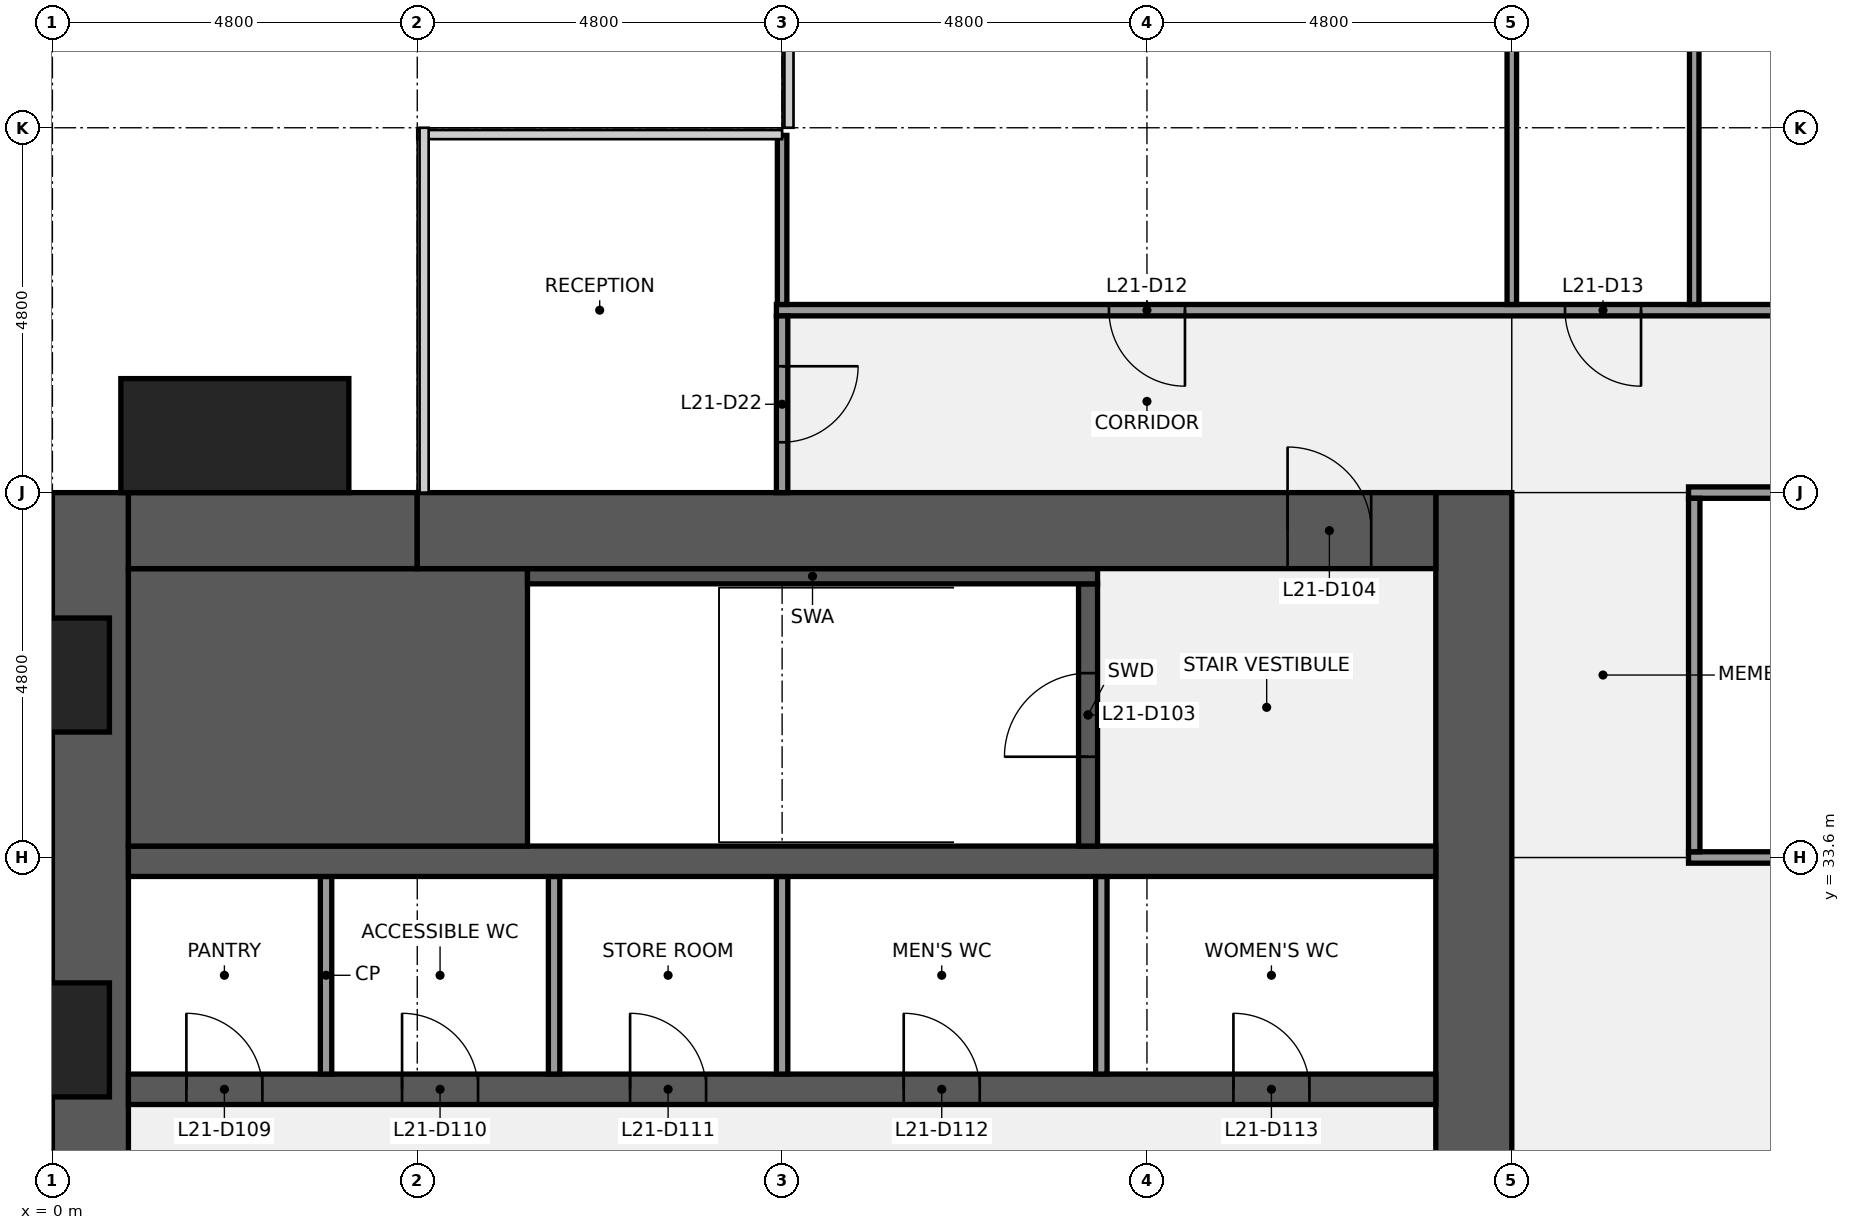
"""IFC4 building model, lengths in metres.
Left out: names, types, materials, properties, quantities, classifications, styles, units other than length and angle.
Written with IfcOpenShell. Run it as: python <this file> out.ifc"""

import sys

from ifc_helpers import new_model, si_unit, direction, frame, frame_2d, origin, origin_2d, place, context, subcontext, project, spatial, rectangle, extrude, element, fill, save


model = new_model("IFC4")
c1 = context("Model", 3, precision=1e-05, world=origin(), true_north=direction((0.0, 1.0)))
c2 = subcontext(c1, "Body", "Model", "MODEL_VIEW")
j1 = project(units=[si_unit("LENGTHUNIT", "METRE"), si_unit("PLANEANGLEUNIT", "RADIAN")], contexts=[c1])
p1 = place(None, origin())
s1 = spatial("IfcSite", under=j1, at=p1, CompositionType="ELEMENT")
p2 = place(p1, origin())
s2 = spatial("IfcBuilding", under=s1, at=p2, CompositionType="ELEMENT")
p3 = place(p2, frame((0.0, 0.0, 104.1)))
s3 = spatial("IfcBuildingStorey", under=s2, at=p3, CompositionType="ELEMENT", Elevation=104.1)
p4 = place(p3, frame((0.5, 9.6, 0.0), z_axis=(0.0, 0.0, 1.0), x_axis=(0.0, 1.0, 0.0)))
e1 = element("IfcWall", 1, at=p4, inside=s3, PredefinedType="SHEAR", context=c2, shape_type="SweptSolid", body=[
    extrude(rectangle(XDim=28.8, YDim=1.0, at=frame_2d((14.4, 0.0))), origin(), (0.0, 0.0, 1.0), 3.84),
])
p5 = place(p4, frame((8.85, 0.0, 0.9)))
e2 = element("IfcOpeningElement", 2, at=p5, cuts=e1, PredefinedType="OPENING", context=c2, shape_type="SweptSolid", body=[
    extrude(rectangle(XDim=1.5, YDim=1.5, at=frame_2d((0.75, 0.75))), frame((0.0, 0.51, 0.0), z_axis=(0.0, -1.0, 0.0), x_axis=(1.0, 0.0, 0.0)), (0.0, 0.0, 1.0), 1.02),
])
p6 = place(p4, frame((18.45, 0.0, 0.9)))
e3 = element("IfcOpeningElement", 3, at=p6, cuts=e1, PredefinedType="OPENING", context=c2, shape_type="SweptSolid", body=[
    extrude(rectangle(XDim=1.5, YDim=1.5, at=frame_2d((0.75, 0.75))), frame((0.0, 0.51, 0.0), z_axis=(0.0, -1.0, 0.0), x_axis=(1.0, 0.0, 0.0)), (0.0, 0.0, 1.0), 1.02),
])
p7 = place(p3, frame((18.7, 38.4, 0.0), z_axis=(0.0, 0.0, 1.0), x_axis=(0.0, -1.0, 0.0)))
e4 = element("IfcWall", 4, at=p7, inside=s3, PredefinedType="SHEAR", context=c2, shape_type="SweptSolid", body=[
    extrude(rectangle(XDim=28.8, YDim=1.0, at=frame_2d((14.4, 0.0))), origin(), (0.0, 0.0, 1.0), 3.84),
])
p8 = place(p7, frame((18.3, 0.0, 0.0)))
e5 = element("IfcOpeningElement", 5, at=p8, cuts=e4, PredefinedType="OPENING", context=c2, shape_type="SweptSolid", body=[
    extrude(rectangle(XDim=1.8, YDim=2.1, at=frame_2d((0.9, 1.05))), frame((0.0, 0.51, 0.0), z_axis=(0.0, -1.0, 0.0), x_axis=(1.0, 0.0, 0.0)), (0.0, 0.0, 1.0), 1.02),
])
p9 = place(p7, frame((8.7, 0.0, 0.0)))
e6 = element("IfcOpeningElement", 6, at=p9, cuts=e4, PredefinedType="OPENING", context=c2, shape_type="SweptSolid", body=[
    extrude(rectangle(XDim=1.8, YDim=2.1, at=frame_2d((0.9, 1.05))), frame((0.0, 0.51, 0.0), z_axis=(0.0, -1.0, 0.0), x_axis=(1.0, 0.0, 0.0)), (0.0, 0.0, 1.0), 1.02),
])
p10 = place(p3, frame((1.0, 30.55, 0.0), z_axis=(0.0, 0.0, 1.0), x_axis=(1.0, 0.0, 0.0)))
e7 = element("IfcWall", 7, at=p10, inside=s3, PredefinedType="SHEAR", context=c2, shape_type="SweptSolid", body=[
    extrude(rectangle(XDim=17.2, YDim=0.4, at=frame_2d((8.6, 0.0))), origin(), (0.0, 0.0, 1.0), 3.84),
])
p11 = place(p10, frame((0.762, 0.0, 0.0)))
e8 = element("IfcOpeningElement", 8, at=p11, cuts=e7, PredefinedType="OPENING", context=c2, shape_type="SweptSolid", body=[
    extrude(rectangle(XDim=1.0, YDim=2.1, at=frame_2d((0.5, 1.05))), frame((0.0, 0.21, 0.0), z_axis=(0.0, -1.0, 0.0), x_axis=(1.0, 0.0, 0.0)), (0.0, 0.0, 1.0), 0.42),
])
p12 = place(p10, frame((3.6, 0.0, 0.0)))
e9 = element("IfcOpeningElement", 9, at=p12, cuts=e7, PredefinedType="OPENING", context=c2, shape_type="SweptSolid", body=[
    extrude(rectangle(XDim=1.0, YDim=2.1, at=frame_2d((0.5, 1.05))), frame((0.0, 0.21, 0.0), z_axis=(0.0, -1.0, 0.0), x_axis=(1.0, 0.0, 0.0)), (0.0, 0.0, 1.0), 0.42),
])
p13 = place(p10, frame((6.6, 0.0, 0.0)))
e10 = element("IfcOpeningElement", 10, at=p13, cuts=e7, PredefinedType="OPENING", context=c2, shape_type="SweptSolid", body=[
    extrude(rectangle(XDim=1.0, YDim=2.1, at=frame_2d((0.5, 1.05))), frame((0.0, 0.21, 0.0), z_axis=(0.0, -1.0, 0.0), x_axis=(1.0, 0.0, 0.0)), (0.0, 0.0, 1.0), 0.42),
])
p14 = place(p10, frame((10.2, 0.0, 0.0)))
e11 = element("IfcOpeningElement", 11, at=p14, cuts=e7, PredefinedType="OPENING", context=c2, shape_type="SweptSolid", body=[
    extrude(rectangle(XDim=1.0, YDim=2.1, at=frame_2d((0.5, 1.05))), frame((0.0, 0.21, 0.0), z_axis=(0.0, -1.0, 0.0), x_axis=(1.0, 0.0, 0.0)), (0.0, 0.0, 1.0), 0.42),
])
p15 = place(p10, frame((14.538, 0.0, 0.0)))
e12 = element("IfcOpeningElement", 12, at=p15, cuts=e7, PredefinedType="OPENING", context=c2, shape_type="SweptSolid", body=[
    extrude(rectangle(XDim=1.0, YDim=2.1, at=frame_2d((0.5, 1.05))), frame((0.0, 0.21, 0.0), z_axis=(0.0, -1.0, 0.0), x_axis=(1.0, 0.0, 0.0)), (0.0, 0.0, 1.0), 0.42),
])
for number, where, z_axis, x_axis in (
    (13, (3.6, 30.75, 0.0), (0.0, 0.0, 1.0), (0.0, 1.0, 0.0)),
    (14, (6.6, 30.75, 0.0), (0.0, 0.0, 1.0), (0.0, 1.0, 0.0)),
    (15, (9.6, 30.75, 0.0), (0.0, 0.0, 1.0), (0.0, 1.0, 0.0)),
    (16, (13.8, 30.75, 0.0), (0.0, 0.0, 1.0), (0.0, 1.0, 0.0)),
):
    element("IfcWall", number, at=place(p3, frame(where, z_axis=z_axis, x_axis=x_axis)), inside=s3, PredefinedType="PARTITIONING", context=c2, shape_type="SweptSolid", body=[
        extrude(rectangle(XDim=2.6, YDim=0.15, at=frame_2d((1.3, 0.0))), origin(), (0.0, 0.0, 1.0), 3.84),
    ])
p16 = place(p3, frame((1.0, 33.55, 0.0), z_axis=(0.0, 0.0, 1.0), x_axis=(1.0, 0.0, 0.0)))
e17 = element("IfcWall", 17, at=p16, inside=s3, PredefinedType="SHEAR", context=c2, shape_type="SweptSolid", body=[
    extrude(rectangle(XDim=17.2, YDim=0.4, at=frame_2d((8.6, 0.0))), origin(), (0.0, 0.0, 1.0), 3.84),
])
p17 = place(p3, frame((1.0, 35.575, 0.0), z_axis=(0.0, 0.0, 1.0), x_axis=(1.0, 0.0, 0.0)))
e18 = element("IfcWall", 18, at=p17, inside=s3, PredefinedType="SHEAR", context=c2, shape_type="SweptSolid", body=[
    extrude(rectangle(XDim=5.25, YDim=3.65, at=frame_2d((2.625, 0.0))), origin(), (0.0, 0.0, 1.0), 3.84),
])
p18 = place(p3, frame((13.625, 33.75, 0.0), z_axis=(0.0, 0.0, 1.0), x_axis=(0.0, 1.0, 0.0)))
e19 = element("IfcWall", 19, at=p18, inside=s3, PredefinedType="SHEAR", context=c2, shape_type="SweptSolid", body=[
    extrude(rectangle(XDim=3.45, YDim=0.25, at=frame_2d((1.725, 0.0))), origin(), (0.0, 0.0, 1.0), 3.84),
])
p19 = place(p18, frame((1.175, 0.0, 0.0)))
e20 = element("IfcOpeningElement", 20, at=p19, cuts=e19, PredefinedType="OPENING", context=c2, shape_type="SweptSolid", body=[
    extrude(rectangle(XDim=1.1, YDim=2.1, at=frame_2d((0.55, 1.05))), frame((0.0, 0.135, 0.0), z_axis=(0.0, -1.0, 0.0), x_axis=(1.0, 0.0, 0.0)), (0.0, 0.0, 1.0), 0.27),
])
p20 = place(p3, frame((6.25, 37.3, 0.0), z_axis=(0.0, 0.0, 1.0), x_axis=(1.0, 0.0, 0.0)))
e21 = element("IfcWall", 21, at=p20, inside=s3, PredefinedType="SHEAR", context=c2, shape_type="SweptSolid", body=[
    extrude(rectangle(XDim=7.5, YDim=0.2, at=frame_2d((3.75, 0.0))), origin(), (0.0, 0.0, 1.0), 3.84),
])
p21 = place(p3, frame((1.0, 37.9, 0.0), z_axis=(0.0, 0.0, 1.0), x_axis=(1.0, 0.0, 0.0)))
e22 = element("IfcWall", 22, at=p21, inside=s3, PredefinedType="SHEAR", context=c2, shape_type="SweptSolid", body=[
    extrude(rectangle(XDim=3.8, YDim=1.0, at=frame_2d((1.9, 0.0))), origin(), (0.0, 0.0, 1.0), 3.84),
])
p22 = place(p3, frame((4.8, 37.9, 0.0), z_axis=(0.0, 0.0, 1.0), x_axis=(1.0, 0.0, 0.0)))
e23 = element("IfcWall", 23, at=p22, inside=s3, PredefinedType="SHEAR", context=c2, shape_type="SweptSolid", body=[
    extrude(rectangle(XDim=13.4, YDim=1.0, at=frame_2d((6.7, 0.0))), origin(), (0.0, 0.0, 1.0), 3.84),
])
p23 = place(p22, frame((11.45, 0.0, 0.0)))
e24 = element("IfcOpeningElement", 24, at=p23, cuts=e23, PredefinedType="OPENING", context=c2, shape_type="SweptSolid", body=[
    extrude(rectangle(XDim=1.1, YDim=2.1, at=frame_2d((0.55, 1.05))), frame((0.0, 0.51, 0.0), z_axis=(0.0, -1.0, 0.0), x_axis=(1.0, 0.0, 0.0)), (0.0, 0.0, 1.0), 1.02),
])
p24 = place(p3, frame((21.525, 33.6, 0.0), z_axis=(0.0, 0.0, 1.0), x_axis=(1.0, 0.0, 0.0)))
e25 = element("IfcWall", 25, at=p24, inside=s3, PredefinedType="PARTITIONING", context=c2, shape_type="SweptSolid", body=[
    extrude(rectangle(XDim=4.95, YDim=0.15, at=frame_2d((2.475, 0.0))), origin(), (0.0, 0.0, 1.0), 2.936),
])
p25 = place(p3, frame((21.525, 38.4, 0.0), z_axis=(0.0, 0.0, 1.0), x_axis=(1.0, 0.0, 0.0)))
e26 = element("IfcWall", 26, at=p25, inside=s3, PredefinedType="PARTITIONING", context=c2, shape_type="SweptSolid", body=[
    extrude(rectangle(XDim=14.55, YDim=0.15, at=frame_2d((7.275, 0.0))), origin(), (0.0, 0.0, 1.0), 2.936),
])
p26 = place(p25, frame((3.175, 0.0, 0.0)))
e27 = element("IfcOpeningElement", 27, at=p26, cuts=e26, PredefinedType="OPENING", context=c2, shape_type="SweptSolid", body=[
    extrude(rectangle(XDim=1.0, YDim=2.1, at=frame_2d((0.5, 1.05))), frame((0.0, 0.085, 0.0), z_axis=(0.0, -1.0, 0.0), x_axis=(1.0, 0.0, 0.0)), (0.0, 0.0, 1.0), 0.17),
])
p27 = place(p25, frame((10.375, 0.0, 0.0)))
e28 = element("IfcOpeningElement", 28, at=p27, cuts=e26, PredefinedType="OPENING", context=c2, shape_type="SweptSolid", body=[
    extrude(rectangle(XDim=1.0, YDim=2.1, at=frame_2d((0.5, 1.05))), frame((0.0, 0.085, 0.0), z_axis=(0.0, -1.0, 0.0), x_axis=(1.0, 0.0, 0.0)), (0.0, 0.0, 1.0), 0.17),
])
p28 = place(p3, frame((9.525, 40.8, 0.0), z_axis=(0.0, 0.0, 1.0), x_axis=(1.0, 0.0, 0.0)))
e29 = element("IfcWall", 29, at=p28, inside=s3, PredefinedType="PARTITIONING", context=c2, shape_type="SweptSolid", body=[
    extrude(rectangle(XDim=38.55, YDim=0.15, at=frame_2d((19.275, 0.0))), origin(), (0.0, 0.0, 1.0), 2.936),
])
p29 = place(p28, frame((4.375, 0.0, 0.0)))
e30 = element("IfcOpeningElement", 30, at=p29, cuts=e29, PredefinedType="OPENING", context=c2, shape_type="SweptSolid", body=[
    extrude(rectangle(XDim=1.0, YDim=2.1, at=frame_2d((0.5, 1.05))), frame((0.0, 0.085, 0.0), z_axis=(0.0, -1.0, 0.0), x_axis=(1.0, 0.0, 0.0)), (0.0, 0.0, 1.0), 0.17),
])
p30 = place(p28, frame((10.375, 0.0, 0.0)))
e31 = element("IfcOpeningElement", 31, at=p30, cuts=e29, PredefinedType="OPENING", context=c2, shape_type="SweptSolid", body=[
    extrude(rectangle(XDim=1.0, YDim=2.1, at=frame_2d((0.5, 1.05))), frame((0.0, 0.085, 0.0), z_axis=(0.0, -1.0, 0.0), x_axis=(1.0, 0.0, 0.0)), (0.0, 0.0, 1.0), 0.17),
])
p31 = place(p28, frame((13.975, 0.0, 0.0)))
e32 = element("IfcOpeningElement", 32, at=p31, cuts=e29, PredefinedType="OPENING", context=c2, shape_type="SweptSolid", body=[
    extrude(rectangle(XDim=1.0, YDim=2.1, at=frame_2d((0.5, 1.05))), frame((0.0, 0.085, 0.0), z_axis=(0.0, -1.0, 0.0), x_axis=(1.0, 0.0, 0.0)), (0.0, 0.0, 1.0), 0.17),
])
p32 = place(p28, frame((17.575, 0.0, 0.0)))
e33 = element("IfcOpeningElement", 33, at=p32, cuts=e29, PredefinedType="OPENING", context=c2, shape_type="SweptSolid", body=[
    extrude(rectangle(XDim=1.0, YDim=2.1, at=frame_2d((0.5, 1.05))), frame((0.0, 0.085, 0.0), z_axis=(0.0, -1.0, 0.0), x_axis=(1.0, 0.0, 0.0)), (0.0, 0.0, 1.0), 0.17),
])
p33 = place(p28, frame((19.975, 0.0, 0.0)))
e34 = element("IfcOpeningElement", 34, at=p33, cuts=e29, PredefinedType="OPENING", context=c2, shape_type="SweptSolid", body=[
    extrude(rectangle(XDim=1.0, YDim=2.1, at=frame_2d((0.5, 1.05))), frame((0.0, 0.085, 0.0), z_axis=(0.0, -1.0, 0.0), x_axis=(1.0, 0.0, 0.0)), (0.0, 0.0, 1.0), 0.17),
])
p34 = place(p28, frame((24.775, 0.0, 0.0)))
e35 = element("IfcOpeningElement", 35, at=p34, cuts=e29, PredefinedType="OPENING", context=c2, shape_type="SweptSolid", body=[
    extrude(rectangle(XDim=1.0, YDim=2.1, at=frame_2d((0.5, 1.05))), frame((0.0, 0.085, 0.0), z_axis=(0.0, -1.0, 0.0), x_axis=(1.0, 0.0, 0.0)), (0.0, 0.0, 1.0), 0.17),
])
p35 = place(p28, frame((33.175, 0.0, 0.0)))
e36 = element("IfcOpeningElement", 36, at=p35, cuts=e29, PredefinedType="OPENING", context=c2, shape_type="SweptSolid", body=[
    extrude(rectangle(XDim=1.0, YDim=2.1, at=frame_2d((0.5, 1.05))), frame((0.0, 0.085, 0.0), z_axis=(0.0, -1.0, 0.0), x_axis=(1.0, 0.0, 0.0)), (0.0, 0.0, 1.0), 0.17),
])
p36 = place(p3, frame((9.6, 40.875, 0.0), z_axis=(0.0, 0.0, 1.0), x_axis=(0.0, 1.0, 0.0)))
e37 = element("IfcWall", 37, at=p36, inside=s3, PredefinedType="PARTITIONING", context=c2, shape_type="SweptSolid", body=[
    extrude(rectangle(XDim=2.225, YDim=0.125, at=frame_2d((1.113, 0.0))), origin(), (0.0, 0.0, 1.0), 2.936),
])
p37 = place(p3, frame((9.6, 38.4, 0.0), z_axis=(0.0, 0.0, 1.0), x_axis=(0.0, 1.0, 0.0)))
e38 = element("IfcWall", 38, at=p37, inside=s3, PredefinedType="PARTITIONING", context=c2, shape_type="SweptSolid", body=[
    extrude(rectangle(XDim=2.325, YDim=0.15, at=frame_2d((1.163, 0.0))), origin(), (0.0, 0.0, 1.0), 2.936),
])
p38 = place(p37, frame((0.663, 0.0, 0.0)))
e39 = element("IfcOpeningElement", 39, at=p38, cuts=e38, PredefinedType="OPENING", context=c2, shape_type="SweptSolid", body=[
    extrude(rectangle(XDim=1.0, YDim=2.1, at=frame_2d((0.5, 1.05))), frame((0.0, 0.085, 0.0), z_axis=(0.0, -1.0, 0.0), x_axis=(1.0, 0.0, 0.0)), (0.0, 0.0, 1.0), 0.17),
])
p39 = place(p3, frame((19.2, 40.875, 0.0), z_axis=(0.0, 0.0, 1.0), x_axis=(0.0, 1.0, 0.0)))
e40 = element("IfcWall", 40, at=p39, inside=s3, PredefinedType="PARTITIONING", context=c2, shape_type="SweptSolid", body=[
    extrude(rectangle(XDim=6.525, YDim=0.125, at=frame_2d((3.262, 0.0))), origin(), (0.0, 0.0, 1.0), 2.936),
])
p40 = place(p3, frame((21.6, 40.875, 0.0), z_axis=(0.0, 0.0, 1.0), x_axis=(0.0, 1.0, 0.0)))
e41 = element("IfcWall", 41, at=p40, inside=s3, PredefinedType="PARTITIONING", context=c2, shape_type="SweptSolid", body=[
    extrude(rectangle(XDim=7.025, YDim=0.125, at=frame_2d((3.512, 0.0))), origin(), (0.0, 0.0, 1.0), 2.936),
])
p41 = place(p3, frame((21.6, 33.675, 0.0), z_axis=(0.0, 0.0, 1.0), x_axis=(0.0, 1.0, 0.0)))
e42 = element("IfcWall", 42, at=p41, inside=s3, PredefinedType="PARTITIONING", context=c2, shape_type="SweptSolid", body=[
    extrude(rectangle(XDim=4.65, YDim=0.15, at=frame_2d((2.325, 0.0))), origin(), (0.0, 0.0, 1.0), 2.936),
])
p42 = place(p3, frame((2.4, 39.15, 0.0), z_axis=(0.0, 0.0, 1.0), x_axis=(1.0, 0.0, 0.0)))
e43 = element("IfcColumn", 43, at=p42, inside=s3, PredefinedType="PILASTER", context=c2, shape_type="SweptSolid", body=[
    extrude(rectangle(XDim=3.0, YDim=1.5, at=origin_2d()), origin(), (0.0, 0.0, 1.0), 4.0),
])
p43 = place(p19, origin())
e44 = element("IfcDoor", 44, at=p43, inside=s3, OperationType="SINGLE_SWING_LEFT", PredefinedType="DOOR", context=c2, shape_type="SweptSolid", body=[
    extrude(rectangle(XDim=1.1, YDim=2.1, at=frame_2d((0.55, 1.05))), frame((0.0, 0.025, 0.0), z_axis=(0.0, -1.0, 0.0), x_axis=(1.0, 0.0, 0.0)), (0.0, 0.0, 1.0), 0.05),
])
fill(e20, e44)
p44 = place(p23, origin())
e45 = element("IfcDoor", 45, at=p44, inside=s3, OperationType="SINGLE_SWING_LEFT", PredefinedType="DOOR", context=c2, shape_type="SweptSolid", body=[
    extrude(rectangle(XDim=1.1, YDim=2.1, at=frame_2d((0.55, 1.05))), frame((0.0, 0.025, 0.0), z_axis=(0.0, -1.0, 0.0), x_axis=(1.0, 0.0, 0.0)), (0.0, 0.0, 1.0), 0.05),
])
fill(e24, e45)
p45 = place(p11, origin())
e46 = element("IfcDoor", 46, at=p45, inside=s3, OperationType="SINGLE_SWING_LEFT", PredefinedType="DOOR", context=c2, shape_type="SweptSolid", body=[
    extrude(rectangle(XDim=1.0, YDim=2.1, at=frame_2d((0.5, 1.05))), frame((0.0, 0.025, 0.0), z_axis=(0.0, -1.0, 0.0), x_axis=(1.0, 0.0, 0.0)), (0.0, 0.0, 1.0), 0.05),
])
fill(e8, e46)
p46 = place(p12, origin())
e47 = element("IfcDoor", 47, at=p46, inside=s3, OperationType="SINGLE_SWING_LEFT", PredefinedType="DOOR", context=c2, shape_type="SweptSolid", body=[
    extrude(rectangle(XDim=1.0, YDim=2.1, at=frame_2d((0.5, 1.05))), frame((0.0, 0.025, 0.0), z_axis=(0.0, -1.0, 0.0), x_axis=(1.0, 0.0, 0.0)), (0.0, 0.0, 1.0), 0.05),
])
fill(e9, e47)
p47 = place(p13, origin())
e48 = element("IfcDoor", 48, at=p47, inside=s3, OperationType="SINGLE_SWING_LEFT", PredefinedType="DOOR", context=c2, shape_type="SweptSolid", body=[
    extrude(rectangle(XDim=1.0, YDim=2.1, at=frame_2d((0.5, 1.05))), frame((0.0, 0.025, 0.0), z_axis=(0.0, -1.0, 0.0), x_axis=(1.0, 0.0, 0.0)), (0.0, 0.0, 1.0), 0.05),
])
fill(e10, e48)
p48 = place(p14, origin())
e49 = element("IfcDoor", 49, at=p48, inside=s3, OperationType="SINGLE_SWING_LEFT", PredefinedType="DOOR", context=c2, shape_type="SweptSolid", body=[
    extrude(rectangle(XDim=1.0, YDim=2.1, at=frame_2d((0.5, 1.05))), frame((0.0, 0.025, 0.0), z_axis=(0.0, -1.0, 0.0), x_axis=(1.0, 0.0, 0.0)), (0.0, 0.0, 1.0), 0.05),
])
fill(e11, e49)
p49 = place(p15, origin())
e50 = element("IfcDoor", 50, at=p49, inside=s3, OperationType="SINGLE_SWING_LEFT", PredefinedType="DOOR", context=c2, shape_type="SweptSolid", body=[
    extrude(rectangle(XDim=1.0, YDim=2.1, at=frame_2d((0.5, 1.05))), frame((0.0, 0.025, 0.0), z_axis=(0.0, -1.0, 0.0), x_axis=(1.0, 0.0, 0.0)), (0.0, 0.0, 1.0), 0.05),
])
fill(e12, e50)
p50 = place(p29, origin())
e51 = element("IfcDoor", 51, at=p50, inside=s3, OperationType="SINGLE_SWING_RIGHT", PredefinedType="DOOR", context=c2, shape_type="SweptSolid", body=[
    extrude(rectangle(XDim=1.0, YDim=2.1, at=frame_2d((0.5, 1.05))), frame((0.0, 0.025, 0.0), z_axis=(0.0, -1.0, 0.0), x_axis=(1.0, 0.0, 0.0)), (0.0, 0.0, 1.0), 0.05),
])
fill(e30, e51)
p51 = place(p30, origin())
e52 = element("IfcDoor", 52, at=p51, inside=s3, OperationType="SINGLE_SWING_RIGHT", PredefinedType="DOOR", context=c2, shape_type="SweptSolid", body=[
    extrude(rectangle(XDim=1.0, YDim=2.1, at=frame_2d((0.5, 1.05))), frame((0.0, 0.025, 0.0), z_axis=(0.0, -1.0, 0.0), x_axis=(1.0, 0.0, 0.0)), (0.0, 0.0, 1.0), 0.05),
])
fill(e31, e52)
p52 = place(p38, origin())
e53 = element("IfcDoor", 53, at=p52, inside=s3, OperationType="SINGLE_SWING_RIGHT", PredefinedType="DOOR", context=c2, shape_type="SweptSolid", body=[
    extrude(rectangle(XDim=1.0, YDim=2.1, at=frame_2d((0.5, 1.05))), frame((0.0, 0.025, 0.0), z_axis=(0.0, -1.0, 0.0), x_axis=(1.0, 0.0, 0.0)), (0.0, 0.0, 1.0), 0.05),
])
fill(e39, e53)
save(model, sys.argv[1])
